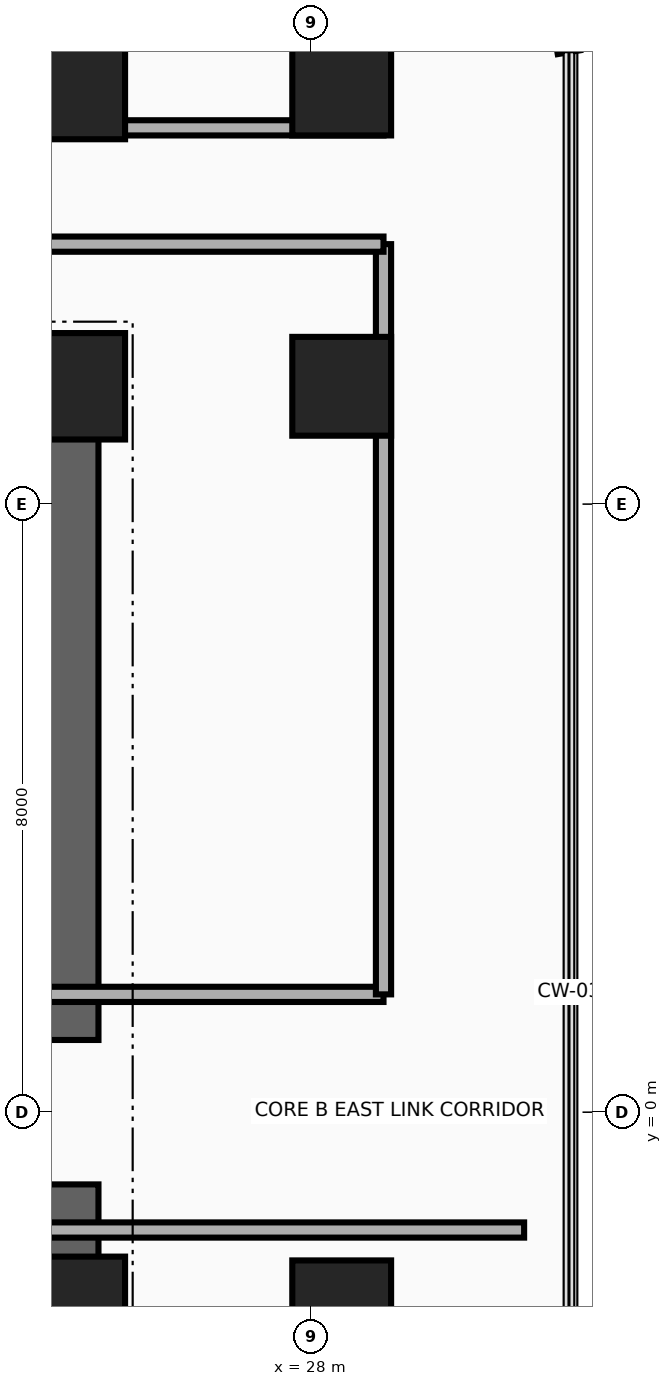
"""IFC4 building model, lengths in metres.
Left out: names, types, materials, properties, quantities, classifications, styles, units other than length and angle.
Written with IfcOpenShell. Run it as: python <this file> out.ifc"""

import sys

from ifc_helpers import new_model, si_unit, direction, frame, frame_2d, origin, origin_2d, place, context, subcontext, project, spatial, rectangle, circle, extrude, source, transform, mapped, element, save


model = new_model("IFC4")
c1 = context("Model", 3, precision=1e-05, world=origin(), true_north=direction((0.0, 1.0)))
c2 = subcontext(c1, "Body", "Model", "MODEL_VIEW")
j1 = project(units=[si_unit("LENGTHUNIT", "METRE"), si_unit("PLANEANGLEUNIT", "RADIAN")], contexts=[c1])
p1 = place(None, origin())
s1 = spatial("IfcSite", under=j1, at=p1, CompositionType="ELEMENT")
p2 = place(p1, origin())
s2 = spatial("IfcBuilding", under=s1, at=p2, CompositionType="ELEMENT")
p3 = place(p2, frame((0.0, 0.0, 96.3)))
s3 = spatial("IfcBuildingStorey", under=s2, at=p3, CompositionType="ELEMENT", Elevation=96.3)
for number, where, z_axis, x_axis in (
    (1, (24.85, -9.9, 0.0), (0.0, 0.0, 1.0), (0.0, 1.0, 0.0)),
    (2, (24.85, 0.95, 0.0), (0.0, 0.0, 1.0), (0.0, 1.0, 0.0)),
):
    element("IfcWall", number, at=place(p3, frame(where, z_axis=z_axis, x_axis=x_axis)), inside=s3, PredefinedType="SHEAR", context=c2, shape_type="SweptSolid", body=[
        extrude(rectangle(XDim=8.95, YDim=0.7, at=frame_2d((4.475, 0.0))), origin(), (0.0, 0.0, 1.0), 4.56),
    ])
p4 = place(p3, frame((15.85, 9.55, 0.0), z_axis=(0.0, 0.0, 1.0), x_axis=(1.0, 0.0, 0.0)))
e3 = element("IfcWall", 3, at=p4, inside=s3, PredefinedType="SHEAR", context=c2, shape_type="SweptSolid", body=[
    extrude(rectangle(XDim=9.0, YDim=0.7, at=frame_2d((4.5, 0.0))), origin(), (0.0, 0.0, 1.0), 4.56),
])
m1 = source(origin(), c2, "Body", "SweptSolid", [
    extrude(rectangle(XDim=1.4, YDim=1.4, at=origin_2d()), origin(), (0.0, 0.0, 1.0), 4.8),
])
p5 = place(p3, frame((24.85, -2.6, 0.0), z_axis=(0.0, 0.0, 1.0), x_axis=(1.0, 0.0, 0.0)))
e4 = element("IfcColumn", 4, at=p5, inside=s3, PredefinedType="COLUMN", context=c2, shape_type="MappedRepresentation", body=[
    mapped(m1, transform((0.0, 0.0, 0.0), x_axis=(1.0, 0.0, 0.0), y_axis=(0.0, 1.0, 0.0), z_axis=(0.0, 0.0, 1.0), scale=1.0)),
])
m2 = source(origin(), c2, "Body", "SweptSolid", [
    extrude(circle(Radius=0.65, at=origin_2d()), origin(), (0.0, 0.0, 1.0), 4.8),
])
p6 = place(p3, frame((28.4, -2.6, 0.0), z_axis=(0.0, 0.0, 1.0), x_axis=(1.0, 0.0, 0.0)))
e5 = element("IfcColumn", 5, at=p6, inside=s3, PredefinedType="COLUMN", context=c2, shape_type="MappedRepresentation", body=[
    mapped(m2, transform((0.0, 0.0, 0.0), x_axis=(1.0, 0.0, 0.0), y_axis=(0.0, 1.0, 0.0), z_axis=(0.0, 0.0, 1.0), scale=1.0)),
])
p7 = place(p3, frame((24.85, 9.55, 0.0), z_axis=(0.0, 0.0, 1.0), x_axis=(1.0, 0.0, 0.0)))
e6 = element("IfcColumn", 6, at=p7, inside=s3, PredefinedType="COLUMN", context=c2, shape_type="MappedRepresentation", body=[
    mapped(m1, transform((0.0, 0.0, 0.0), x_axis=(1.0, 0.0, 0.0), y_axis=(0.0, 1.0, 0.0), z_axis=(0.0, 0.0, 1.0), scale=1.0)),
])
p8 = place(p3, frame((28.4, 9.55, 0.0), z_axis=(0.0, 0.0, 1.0), x_axis=(1.0, 0.0, 0.0)))
e7 = element("IfcColumn", 7, at=p8, inside=s3, PredefinedType="COLUMN", context=c2, shape_type="MappedRepresentation", body=[
    mapped(m2, transform((0.0, 0.0, 0.0), x_axis=(1.0, 0.0, 0.0), y_axis=(0.0, 1.0, 0.0), z_axis=(0.0, 0.0, 1.0), scale=1.0)),
])
p9 = place(p3, frame((24.85, 13.5, 0.0), z_axis=(0.0, 0.0, 1.0), x_axis=(1.0, 0.0, 0.0)))
e8 = element("IfcColumn", 8, at=p9, inside=s3, PredefinedType="COLUMN", context=c2, shape_type="MappedRepresentation", body=[
    mapped(m1, transform((0.0, 0.0, 0.0), x_axis=(1.0, 0.0, 0.0), y_axis=(0.0, 1.0, 0.0), z_axis=(0.0, 0.0, 1.0), scale=1.0)),
])
p10 = place(p3, frame((28.4, 13.5, 0.0), z_axis=(0.0, 0.0, 1.0), x_axis=(1.0, 0.0, 0.0)))
e9 = element("IfcColumn", 9, at=p10, inside=s3, PredefinedType="COLUMN", context=c2, shape_type="MappedRepresentation", body=[
    mapped(m2, transform((0.0, 0.0, 0.0), x_axis=(1.0, 0.0, 0.0), y_axis=(0.0, 1.0, 0.0), z_axis=(0.0, 0.0, 1.0), scale=1.0)),
])
p11 = place(p3, frame((31.216, 14.973, 0.0), z_axis=(0.0, 0.0, 1.0), x_axis=(0.167019462117, -0.985953598946, 0.0)))
e10 = element("IfcWall", 10, at=p11, inside=s3, PredefinedType="SOLIDWALL", context=c2, shape_type="SweptSolid", body=[
    extrude(rectangle(XDim=1.042, YDim=0.3, at=frame_2d((0.521, 0.0))), origin(), (0.0, 0.0, 1.0), 4.56),
])
p12 = place(p3, frame((24.35, 1.55, 0.0), z_axis=(0.0, 0.0, 1.0), x_axis=(1.0, 0.0, 0.0)))
e11 = element("IfcWall", 11, at=p12, inside=s3, PredefinedType="PARTITIONING", context=c2, shape_type="SweptSolid", body=[
    extrude(rectangle(XDim=4.6, YDim=0.2, at=frame_2d((2.3, 0.0))), origin(), (0.0, 0.0, 1.0), 3.345),
])
p13 = place(p3, frame((24.35, -1.55, 0.0), z_axis=(0.0, 0.0, 1.0), x_axis=(1.0, 0.0, 0.0)))
e12 = element("IfcWall", 12, at=p13, inside=s3, PredefinedType="PARTITIONING", context=c2, shape_type="SweptSolid", body=[
    extrude(rectangle(XDim=6.45, YDim=0.2, at=frame_2d((3.225, 0.0))), origin(), (0.0, 0.0, 1.0), 3.345),
])
p14 = place(p3, frame((28.95, 1.55, 0.0), z_axis=(0.0, 0.0, 1.0), x_axis=(0.0, 1.0, 0.0)))
e13 = element("IfcWall", 13, at=p14, inside=s3, PredefinedType="PARTITIONING", context=c2, shape_type="SweptSolid", body=[
    extrude(rectangle(XDim=9.87, YDim=0.2, at=frame_2d((4.935, 0.0))), origin(), (0.0, 0.0, 1.0), 4.56),
])
p15 = place(p3, frame((24.35, 12.95, 0.0), z_axis=(0.0, 0.0, 1.0), x_axis=(1.0, 0.0, 0.0)))
e14 = element("IfcWall", 14, at=p15, inside=s3, PredefinedType="PARTITIONING", context=c2, shape_type="SweptSolid", body=[
    extrude(rectangle(XDim=4.6, YDim=0.2, at=frame_2d((2.3, 0.0))), origin(), (0.0, 0.0, 1.0), 3.934),
])
p16 = place(p3, frame((-9.8, 11.42, 0.0), z_axis=(0.0, 0.0, 1.0), x_axis=(1.0, 0.0, 0.0)))
e15 = element("IfcWall", 15, at=p16, inside=s3, PredefinedType="PARTITIONING", context=c2, shape_type="SweptSolid", body=[
    extrude(rectangle(XDim=38.75, YDim=0.2, at=frame_2d((19.375, 0.0))), origin(), (0.0, 0.0, 1.0), 3.766),
])
save(model, sys.argv[1])
